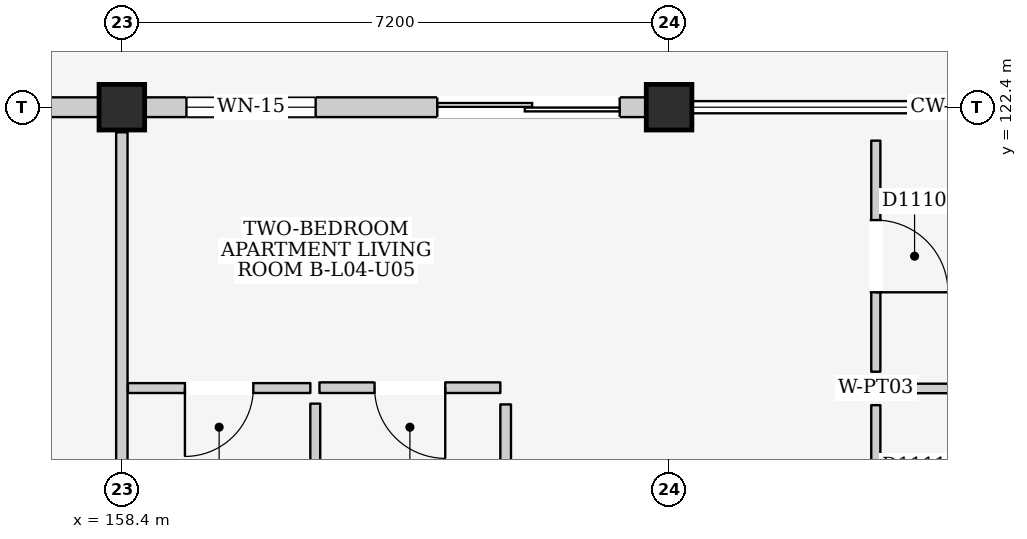
"""IFC4 building model, lengths in metres.
Left out: names, types, materials, properties, quantities, classifications, styles, units other than length and angle.
Written with IfcOpenShell. Run it as: python <this file> out.ifc"""

import sys

from ifc_helpers import new_model, si_unit, direction, frame, frame_2d, origin, origin_2d, place, context, subcontext, project, spatial, rectangle, extrude, element, fill, save


model = new_model("IFC4")
c1 = context("Model", 3, precision=1e-05, world=origin(), true_north=direction((0.0, 1.0)))
c2 = subcontext(c1, "Body", "Model", "MODEL_VIEW")
j1 = project(units=[si_unit("LENGTHUNIT", "METRE"), si_unit("PLANEANGLEUNIT", "RADIAN")], contexts=[c1])
p1 = place(None, origin())
s1 = spatial("IfcSite", under=j1, at=p1, CompositionType="ELEMENT")
p2 = place(p1, origin())
s2 = spatial("IfcBuilding", under=s1, at=p2, CompositionType="ELEMENT")
p3 = place(p2, frame((0.0, 0.0, 15.4)))
s3 = spatial("IfcBuildingStorey", under=s2, at=p3, CompositionType="ELEMENT", Elevation=15.4)
for number, where, z_axis, x_axis in (
    (1, (158.4, 122.4, 0.0), (0.0, 0.0, 1.0), (1.0, 0.0, 0.0)),
    (2, (165.6, 122.4, 0.0), (0.0, 0.0, 1.0), (1.0, 0.0, 0.0)),
):
    element("IfcColumn", number, at=place(p3, frame(where, z_axis=z_axis, x_axis=x_axis)), inside=s3, PredefinedType="COLUMN", context=c2, shape_type="SweptSolid", body=[
        extrude(rectangle(XDim=0.6, YDim=0.6, at=origin_2d()), origin(), (0.0, 0.0, 1.0), 3.2),
    ])
p4 = place(p3, frame((151.5, 122.4, 0.0), z_axis=(0.0, 0.0, 1.0), x_axis=(1.0, 0.0, 0.0)))
e3 = element("IfcWall", 3, at=p4, inside=s3, PredefinedType="ELEMENTEDWALL", context=c2, shape_type="SweptSolid", body=[
    extrude(rectangle(XDim=6.6, YDim=0.26, at=frame_2d((3.3, 0.0))), origin(), (0.0, 0.0, 1.0), 2.43),
])
p5 = place(p4, frame((3.85, 0.0, 0.0)))
e4 = element("IfcOpeningElement", 4, at=p5, cuts=e3, PredefinedType="OPENING", context=c2, shape_type="SweptSolid", body=[
    extrude(rectangle(XDim=1.5, YDim=2.12, at=frame_2d((0.75, 1.06))), frame((0.0, 0.145, 0.0), z_axis=(0.0, -1.0, 0.0), x_axis=(1.0, 0.0, 0.0)), (0.0, 0.0, 1.0), 0.29),
])
p6 = place(p4, frame((0.55, 0.0, 0.81)))
e5 = element("IfcOpeningElement", 5, at=p6, cuts=e3, PredefinedType="OPENING", context=c2, shape_type="SweptSolid", body=[
    extrude(rectangle(XDim=1.35, YDim=1.5, at=frame_2d((0.675, 0.75))), frame((0.0, 0.145, 0.0), z_axis=(0.0, -1.0, 0.0), x_axis=(1.0, 0.0, 0.0)), (0.0, 0.0, 1.0), 0.29),
])
p7 = place(p3, frame((158.7, 122.4, 0.0), z_axis=(0.0, 0.0, 1.0), x_axis=(1.0, 0.0, 0.0)))
e6 = element("IfcWall", 6, at=p7, inside=s3, PredefinedType="ELEMENTEDWALL", context=c2, shape_type="SweptSolid", body=[
    extrude(rectangle(XDim=6.6, YDim=0.26, at=frame_2d((3.3, 0.0))), origin(), (0.0, 0.0, 1.0), 2.43),
])
p8 = place(p7, frame((3.85, 0.0, 0.0)))
e7 = element("IfcOpeningElement", 7, at=p8, cuts=e6, PredefinedType="OPENING", context=c2, shape_type="SweptSolid", body=[
    extrude(rectangle(XDim=2.4, YDim=2.12, at=frame_2d((1.2, 1.06))), frame((0.0, 0.145, 0.0), z_axis=(0.0, -1.0, 0.0), x_axis=(1.0, 0.0, 0.0)), (0.0, 0.0, 1.0), 0.29),
])
p9 = place(p7, frame((0.55, 0.0, 0.86)))
e8 = element("IfcOpeningElement", 8, at=p9, cuts=e6, PredefinedType="OPENING", context=c2, shape_type="SweptSolid", body=[
    extrude(rectangle(XDim=1.7, YDim=1.45, at=frame_2d((0.85, 0.725))), frame((0.0, 0.145, 0.0), z_axis=(0.0, -1.0, 0.0), x_axis=(1.0, 0.0, 0.0)), (0.0, 0.0, 1.0), 0.29),
])
p10 = place(p3, frame((158.4, 115.53, 0.0), z_axis=(0.0, 0.0, 1.0), x_axis=(0.0, 1.0, 0.0)))
e9 = element("IfcWall", 9, at=p10, inside=s3, PredefinedType="PARTITIONING", context=c2, shape_type="SweptSolid", body=[
    extrude(rectangle(XDim=6.54, YDim=0.15, at=frame_2d((3.27, 0.0))), origin(), (0.0, 0.0, 1.0), 2.385),
])
p11 = place(p3, frame((158.48, 118.705, 0.0), z_axis=(0.0, 0.0, 1.0), x_axis=(1.0, 0.0, 0.0)))
e10 = element("IfcWall", 10, at=p11, inside=s3, PredefinedType="PARTITIONING", context=c2, shape_type="SweptSolid", body=[
    extrude(rectangle(XDim=2.4, YDim=0.13, at=frame_2d((1.2, 0.0))), origin(), (0.0, 0.0, 1.0), 2.95),
])
p12 = place(p11, frame((0.75, 0.0, 0.0)))
e11 = element("IfcOpeningElement", 11, at=p12, cuts=e10, PredefinedType="OPENING", context=c2, shape_type="SweptSolid", body=[
    extrude(rectangle(XDim=0.9, YDim=2.1, at=frame_2d((0.45, 1.05))), frame((0.0, 0.08, 0.0), z_axis=(0.0, -1.0, 0.0), x_axis=(1.0, 0.0, 0.0)), (0.0, 0.0, 1.0), 0.16),
])
p13 = place(p3, frame((160.945, 115.46, 0.0), z_axis=(0.0, 0.0, 1.0), x_axis=(0.0, 1.0, 0.0)))
e12 = element("IfcWall", 12, at=p13, inside=s3, PredefinedType="PARTITIONING", context=c2, shape_type="SweptSolid", body=[
    extrude(rectangle(XDim=3.04, YDim=0.13, at=frame_2d((1.52, 0.0))), origin(), (0.0, 0.0, 1.0), 2.95),
])
p14 = place(p3, frame((161.0, 118.71, 0.0), z_axis=(0.0, 0.0, 1.0), x_axis=(1.0, 0.0, 0.0)))
e13 = element("IfcWall", 13, at=p14, inside=s3, PredefinedType="PARTITIONING", context=c2, shape_type="SweptSolid", body=[
    extrude(rectangle(XDim=2.38, YDim=0.14, at=frame_2d((1.19, 0.0))), origin(), (0.0, 0.0, 1.0), 2.95),
])
p15 = place(p14, frame((0.725, 0.0, 0.0)))
e14 = element("IfcOpeningElement", 14, at=p15, cuts=e13, PredefinedType="OPENING", context=c2, shape_type="SweptSolid", body=[
    extrude(rectangle(XDim=0.93, YDim=2.14, at=frame_2d((0.465, 1.07))), frame((0.0, 0.085, 0.0), z_axis=(0.0, -1.0, 0.0), x_axis=(1.0, 0.0, 0.0)), (0.0, 0.0, 1.0), 0.17),
])
p16 = place(p3, frame((163.45, 115.43, 0.0), z_axis=(0.0, 0.0, 1.0), x_axis=(0.0, 1.0, 0.0)))
e15 = element("IfcWall", 15, at=p16, inside=s3, PredefinedType="PARTITIONING", context=c2, shape_type="SweptSolid", body=[
    extrude(rectangle(XDim=3.06, YDim=0.14, at=frame_2d((1.53, 0.0))), origin(), (0.0, 0.0, 1.0), 2.95),
])
p17 = place(p3, frame((168.32, 118.92, 0.0), z_axis=(0.0, 0.0, 1.0), x_axis=(0.0, 1.0, 0.0)))
e16 = element("IfcWall", 16, at=p17, inside=s3, PredefinedType="PARTITIONING", context=c2, shape_type="SweptSolid", body=[
    extrude(rectangle(XDim=3.04, YDim=0.12, at=frame_2d((1.52, 0.0))), origin(), (0.0, 0.0, 1.0), 2.95),
])
p18 = place(p17, frame((1.045, 0.0, 0.0)))
e17 = element("IfcOpeningElement", 17, at=p18, cuts=e16, PredefinedType="OPENING", context=c2, shape_type="SweptSolid", body=[
    extrude(rectangle(XDim=0.95, YDim=2.15, at=frame_2d((0.475, 1.075))), frame((0.0, 0.075, 0.0), z_axis=(0.0, -1.0, 0.0), x_axis=(1.0, 0.0, 0.0)), (0.0, 0.0, 1.0), 0.15),
])
p19 = place(p3, frame((168.52, 118.7, 0.0), z_axis=(0.0, 0.0, 1.0), x_axis=(1.0, 0.0, 0.0)))
e18 = element("IfcWall", 18, at=p19, inside=s3, PredefinedType="PARTITIONING", context=c2, shape_type="SweptSolid", body=[
    extrude(rectangle(XDim=4.06, YDim=0.125, at=frame_2d((2.03, 0.0))), origin(), (0.0, 0.0, 1.0), 2.95),
])
p20 = place(p3, frame((168.32, 115.44, 0.0), z_axis=(0.0, 0.0, 1.0), x_axis=(0.0, 1.0, 0.0)))
e19 = element("IfcWall", 19, at=p20, inside=s3, PredefinedType="PARTITIONING", context=c2, shape_type="SweptSolid", body=[
    extrude(rectangle(XDim=3.04, YDim=0.12, at=frame_2d((1.52, 0.0))), origin(), (0.0, 0.0, 1.0), 2.95),
])
p21 = place(p20, frame((1.04, 0.0, 0.0)))
e20 = element("IfcOpeningElement", 20, at=p21, cuts=e19, PredefinedType="OPENING", context=c2, shape_type="SweptSolid", body=[
    extrude(rectangle(XDim=0.96, YDim=2.15, at=frame_2d((0.48, 1.075))), frame((0.0, 0.075, 0.0), z_axis=(0.0, -1.0, 0.0), x_axis=(1.0, 0.0, 0.0)), (0.0, 0.0, 1.0), 0.15),
])
p22 = place(p8, frame((2.4, 0.0, 0.0), z_axis=(0.0, 0.0, 1.0), x_axis=(-1.0, 0.0, 0.0)))
e21 = element("IfcDoor", 21, at=p22, inside=s3, OperationType="DOUBLE_DOOR_SLIDING", PredefinedType="DOOR", context=c2, shape_type="SweptSolid", body=[
    extrude(rectangle(XDim=2.4, YDim=2.12, at=frame_2d((1.2, 1.06))), frame((0.0, 0.025, 0.0), z_axis=(0.0, -1.0, 0.0), x_axis=(1.0, 0.0, 0.0)), (0.0, 0.0, 1.0), 0.05),
])
fill(e7, e21)
p23 = place(p9, origin())
e22 = element("IfcWindow", 22, at=p23, inside=s3, PartitioningType="DOUBLE_PANEL_VERTICAL", PredefinedType="WINDOW", context=c2, shape_type="SweptSolid", body=[
    extrude(rectangle(XDim=1.7, YDim=1.45, at=frame_2d((0.85, 0.725))), frame((0.0, 0.03, 0.0), z_axis=(0.0, -1.0, 0.0), x_axis=(1.0, 0.0, 0.0)), (0.0, 0.0, 1.0), 0.06),
])
fill(e8, e22)
p24 = place(p12, frame((0.9, 0.0, 0.0), z_axis=(0.0, 0.0, 1.0), x_axis=(-1.0, 0.0, 0.0)))
e23 = element("IfcDoor", 23, at=p24, inside=s3, OperationType="SINGLE_SWING_RIGHT", PredefinedType="DOOR", context=c2, shape_type="SweptSolid", body=[
    extrude(rectangle(XDim=0.9, YDim=2.1, at=frame_2d((0.45, 1.05))), frame((0.0, 0.025, 0.0), z_axis=(0.0, -1.0, 0.0), x_axis=(1.0, 0.0, 0.0)), (0.0, 0.0, 1.0), 0.05),
])
fill(e11, e23)
p25 = place(p15, frame((0.93, 0.0, 0.0), z_axis=(0.0, 0.0, 1.0), x_axis=(-1.0, 0.0, 0.0)))
e24 = element("IfcDoor", 24, at=p25, inside=s3, OperationType="SINGLE_SWING_LEFT", PredefinedType="DOOR", context=c2, shape_type="SweptSolid", body=[
    extrude(rectangle(XDim=0.93, YDim=2.14, at=frame_2d((0.465, 1.07))), frame((0.0, 0.025, 0.0), z_axis=(0.0, -1.0, 0.0), x_axis=(1.0, 0.0, 0.0)), (0.0, 0.0, 1.0), 0.05),
])
fill(e14, e24)
p26 = place(p18, frame((0.95, 0.0, 0.0), z_axis=(0.0, 0.0, 1.0), x_axis=(-1.0, 0.0, 0.0)))
e25 = element("IfcDoor", 25, at=p26, inside=s3, OperationType="SINGLE_SWING_RIGHT", PredefinedType="DOOR", context=c2, shape_type="SweptSolid", body=[
    extrude(rectangle(XDim=0.95, YDim=2.15, at=frame_2d((0.475, 1.075))), frame((0.0, 0.025, 0.0), z_axis=(0.0, -1.0, 0.0), x_axis=(1.0, 0.0, 0.0)), (0.0, 0.0, 1.0), 0.05),
])
fill(e17, e25)
save(model, sys.argv[1])
